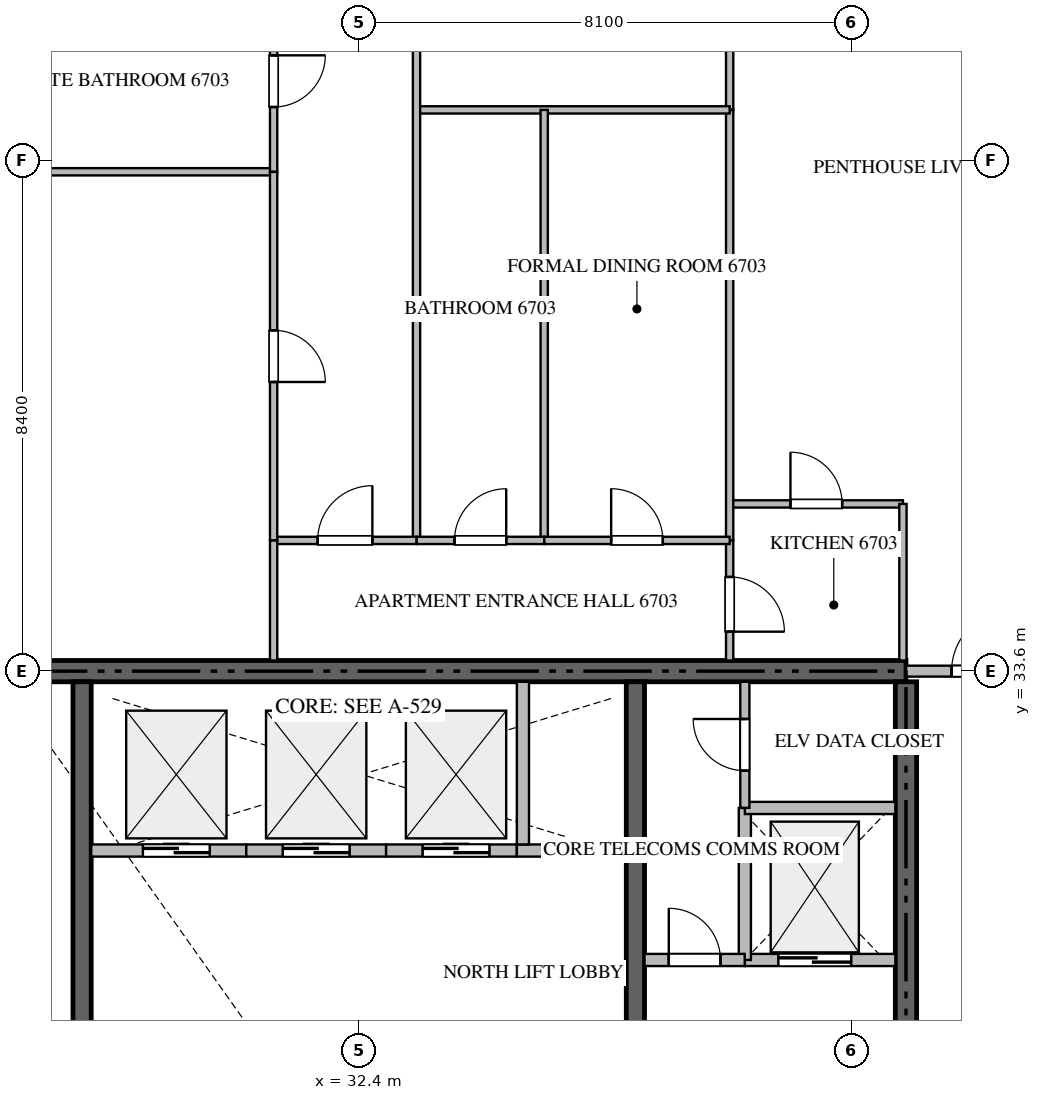
"""IFC4 building model, lengths in metres.
Left out: names, types, materials, properties, quantities, classifications, styles, units other than length and angle.
Written with IfcOpenShell. Run it as: python <this file> out.ifc"""

import sys

from ifc_helpers import new_model, si_unit, direction, frame, frame_2d, origin, place, context, subcontext, project, spatial, rectangle, extrude, source, transform, mapped, element, fill, save


model = new_model("IFC4")
c1 = context("Model", 3, precision=1e-05, world=origin(), true_north=direction((0.0, 1.0)))
c2 = subcontext(c1, "Body", "Model", "MODEL_VIEW")
j1 = project(units=[si_unit("LENGTHUNIT", "METRE"), si_unit("PLANEANGLEUNIT", "RADIAN")], contexts=[c1])
p1 = place(None, origin())
s1 = spatial("IfcSite", under=j1, at=p1, CompositionType="ELEMENT")
p2 = place(p1, origin())
s2 = spatial("IfcBuilding", under=s1, at=p2, CompositionType="ELEMENT")
p3 = place(p2, frame((0.0, 0.0, 268.2)))
s3 = spatial("IfcBuildingStorey", under=s2, at=p3, CompositionType="ELEMENT", Elevation=268.2)
p4 = place(p3, frame((41.4, 33.6, -0.26), z_axis=(0.0, 0.0, 1.0), x_axis=(-1.0, 0.0, 0.0)))
e1 = element("IfcWall", 1, at=p4, inside=s3, PredefinedType="SHEAR", context=c2, shape_type="SweptSolid", body=[
    extrude(rectangle(XDim=18.0, YDim=0.35, at=frame_2d((9.0, 0.0))), origin(), (0.0, 0.0, 1.0), 3.848),
])
p5 = place(p3, frame((41.4, 27.75, -0.26), z_axis=(0.0, 0.0, 1.0), x_axis=(0.0, 1.0, 0.0)))
e2 = element("IfcWall", 2, at=p5, inside=s3, PredefinedType="SHEAR", context=c2, shape_type="SweptSolid", body=[
    extrude(rectangle(XDim=5.675, YDim=0.35, at=frame_2d((2.837, 0.0))), origin(), (0.0, 0.0, 1.0), 3.848),
])
p6 = place(p3, frame((27.85, 23.55, -0.26), z_axis=(0.0, 0.0, 1.0), x_axis=(0.0, 1.0, 0.0)))
e3 = element("IfcWall", 3, at=p6, inside=s3, PredefinedType="SHEAR", context=c2, shape_type="SweptSolid", body=[
    extrude(rectangle(XDim=9.875, YDim=0.3, at=frame_2d((4.938, 0.0))), origin(), (0.0, 0.0, 1.0), 3.848),
])
p7 = place(p3, frame((36.95, 27.05, -0.26), z_axis=(0.0, 0.0, 1.0), x_axis=(0.0, 1.0, 0.0)))
e4 = element("IfcWall", 4, at=p7, inside=s3, PredefinedType="SHEAR", context=c2, shape_type="SweptSolid", body=[
    extrude(rectangle(XDim=6.375, YDim=0.3, at=frame_2d((3.188, 0.0))), origin(), (0.0, 0.0, 1.0), 3.848),
])
p8 = place(p3, frame((38.75, 28.85, 0.0), z_axis=(0.0, 0.0, 1.0), x_axis=(1.0, 0.0, 0.0)))
e5 = element("IfcWall", 5, at=p8, inside=s3, PredefinedType="STANDARD", context=c2, shape_type="SweptSolid", body=[
    extrude(rectangle(XDim=2.475, YDim=0.2, at=frame_2d((1.238, 0.0))), origin(), (0.0, 0.0, 1.0), 3.59),
])
p9 = place(p8, frame((0.55, 0.0, 0.0)))
e6 = element("IfcOpeningElement", 6, at=p9, cuts=e5, PredefinedType="OPENING", context=c2, shape_type="SweptSolid", body=[
    extrude(rectangle(XDim=1.2, YDim=2.2, at=frame_2d((0.6, 1.1))), frame((0.0, 0.11, 0.0), z_axis=(0.0, -1.0, 0.0), x_axis=(1.0, 0.0, 0.0)), (0.0, 0.0, 1.0), 0.22),
])
p10 = place(p3, frame((28.0, 30.65, 0.0), z_axis=(0.0, 0.0, 1.0), x_axis=(1.0, 0.0, 0.0)))
e7 = element("IfcWall", 7, at=p10, inside=s3, PredefinedType="STANDARD", context=c2, shape_type="SweptSolid", body=[
    extrude(rectangle(XDim=2.55, YDim=0.2, at=frame_2d((1.275, 0.0))), origin(), (0.0, 0.0, 1.0), 3.59),
])
p11 = place(p10, frame((0.85, 0.0, 0.0)))
e8 = element("IfcOpeningElement", 8, at=p11, cuts=e7, PredefinedType="OPENING", context=c2, shape_type="SweptSolid", body=[
    extrude(rectangle(XDim=1.1, YDim=2.2, at=frame_2d((0.55, 1.1))), frame((0.0, 0.11, 0.0), z_axis=(0.0, -1.0, 0.0), x_axis=(1.0, 0.0, 0.0)), (0.0, 0.0, 1.0), 0.22),
])
p12 = place(p3, frame((30.55, 30.65, 0.0), z_axis=(0.0, 0.0, 1.0), x_axis=(1.0, 0.0, 0.0)))
e9 = element("IfcWall", 9, at=p12, inside=s3, PredefinedType="STANDARD", context=c2, shape_type="SweptSolid", body=[
    extrude(rectangle(XDim=2.3, YDim=0.2, at=frame_2d((1.15, 0.0))), origin(), (0.0, 0.0, 1.0), 3.59),
])
p13 = place(p12, frame((0.6, 0.0, 0.0)))
e10 = element("IfcOpeningElement", 10, at=p13, cuts=e9, PredefinedType="OPENING", context=c2, shape_type="SweptSolid", body=[
    extrude(rectangle(XDim=1.1, YDim=2.2, at=frame_2d((0.55, 1.1))), frame((0.0, 0.11, 0.0), z_axis=(0.0, -1.0, 0.0), x_axis=(1.0, 0.0, 0.0)), (0.0, 0.0, 1.0), 0.22),
])
p14 = place(p3, frame((32.85, 30.65, 0.0), z_axis=(0.0, 0.0, 1.0), x_axis=(1.0, 0.0, 0.0)))
e11 = element("IfcWall", 11, at=p14, inside=s3, PredefinedType="STANDARD", context=c2, shape_type="SweptSolid", body=[
    extrude(rectangle(XDim=2.15, YDim=0.2, at=frame_2d((1.075, 0.0))), origin(), (0.0, 0.0, 1.0), 3.59),
])
p15 = place(p14, frame((0.6, 0.0, 0.0)))
e12 = element("IfcOpeningElement", 12, at=p15, cuts=e11, PredefinedType="OPENING", context=c2, shape_type="SweptSolid", body=[
    extrude(rectangle(XDim=1.1, YDim=2.2, at=frame_2d((0.55, 1.1))), frame((0.0, 0.11, 0.0), z_axis=(0.0, -1.0, 0.0), x_axis=(1.0, 0.0, 0.0)), (0.0, 0.0, 1.0), 0.22),
])
p16 = place(p3, frame((35.0, 30.65, 0.0), z_axis=(0.0, 0.0, 1.0), x_axis=(1.0, 0.0, 0.0)))
e13 = element("IfcWall", 13, at=p16, inside=s3, PredefinedType="STANDARD", context=c2, shape_type="SweptSolid", body=[
    extrude(rectangle(XDim=1.8, YDim=0.2, at=frame_2d((0.9, 0.0))), origin(), (0.0, 0.0, 1.0), 3.59),
])
p17 = place(p3, frame((35.1, 30.75, 0.0), z_axis=(0.0, 0.0, 1.0), x_axis=(0.0, 1.0, 0.0)))
e14 = element("IfcWall", 14, at=p17, inside=s3, PredefinedType="STANDARD", context=c2, shape_type="SweptSolid", body=[
    extrude(rectangle(XDim=2.675, YDim=0.2, at=frame_2d((1.337, 0.0))), origin(), (0.0, 0.0, 1.0), 3.59),
])
p18 = place(p3, frame((38.75, 28.85, 0.0), z_axis=(0.0, 0.0, 1.0), x_axis=(0.0, 1.0, 0.0)))
e15 = element("IfcWall", 15, at=p18, inside=s3, PredefinedType="STANDARD", context=c2, shape_type="SweptSolid", body=[
    extrude(rectangle(XDim=2.5, YDim=0.2, at=frame_2d((1.25, 0.0))), origin(), (0.0, 0.0, 1.0), 3.59),
])
p19 = place(p3, frame((38.75, 31.35, 0.0), z_axis=(0.0, 0.0, 1.0), x_axis=(1.0, 0.0, 0.0)))
e16 = element("IfcWall", 16, at=p19, inside=s3, PredefinedType="STANDARD", context=c2, shape_type="SweptSolid", body=[
    extrude(rectangle(XDim=2.475, YDim=0.2, at=frame_2d((1.238, 0.0))), origin(), (0.0, 0.0, 1.0), 3.59),
])
p20 = place(p3, frame((37.1, 28.85, 0.0), z_axis=(0.0, 0.0, 1.0), x_axis=(1.0, 0.0, 0.0)))
e17 = element("IfcWall", 17, at=p20, inside=s3, PredefinedType="STANDARD", context=c2, shape_type="SweptSolid", body=[
    extrude(rectangle(XDim=1.648, YDim=0.2, at=frame_2d((0.824, 0.0))), origin(), (0.0, 0.0, 1.0), 3.59),
])
p21 = place(p20, frame((0.399, 0.0, 0.0)))
e18 = element("IfcOpeningElement", 18, at=p21, cuts=e17, PredefinedType="OPENING", context=c2, shape_type="SweptSolid", body=[
    extrude(rectangle(XDim=0.85, YDim=2.1, at=frame_2d((0.425, 1.05))), frame((0.0, 0.11, 0.0), z_axis=(0.0, -1.0, 0.0), x_axis=(1.0, 0.0, 0.0)), (0.0, 0.0, 1.0), 0.22),
])
p22 = place(p3, frame((38.75, 31.352, 0.0), z_axis=(0.0, 0.0, 1.0), x_axis=(0.0, 1.0, 0.0)))
e19 = element("IfcWall", 19, at=p22, inside=s3, PredefinedType="PARTITIONING", context=c2, shape_type="SweptSolid", body=[
    extrude(rectangle(XDim=2.073, YDim=0.15, at=frame_2d((1.037, 0.0))), origin(), (0.0, 0.0, 1.0), 3.59),
])
p23 = place(p22, frame((0.611, 0.0, 0.0)))
e20 = element("IfcOpeningElement", 20, at=p23, cuts=e19, PredefinedType="OPENING", context=c2, shape_type="SweptSolid", body=[
    extrude(rectangle(XDim=0.85, YDim=2.1, at=frame_2d((0.425, 1.05))), frame((0.0, 0.085, 0.0), z_axis=(0.0, -1.0, 0.0), x_axis=(1.0, 0.0, 0.0)), (0.0, 0.0, 1.0), 0.17),
])
p24 = place(p3, frame((41.402, 33.6, 0.0), z_axis=(0.0, 0.0, 1.0), x_axis=(1.0, 0.0, 0.0)))
e21 = element("IfcWall", 21, at=p24, inside=s3, PredefinedType="PARTITIONING", context=c2, shape_type="SweptSolid", body=[
    extrude(rectangle(XDim=2.496, YDim=0.18, at=frame_2d((1.248, 0.0))), origin(), (0.0, 0.0, 1.0), 3.59),
])
p25 = place(p24, frame((0.748, 0.0, 0.0)))
e22 = element("IfcOpeningElement", 22, at=p25, cuts=e21, PredefinedType="OPENING", context=c2, shape_type="SweptSolid", body=[
    extrude(rectangle(XDim=1.0, YDim=2.15, at=frame_2d((0.5, 1.075))), frame((0.0, 0.1, 0.0), z_axis=(0.0, -1.0, 0.0), x_axis=(1.0, 0.0, 0.0)), (0.0, 0.0, 1.0), 0.2),
])
p26 = place(p3, frame((38.5, 36.35, 0.0), z_axis=(0.0, 0.0, 1.0), x_axis=(1.0, 0.0, 0.0)))
e23 = element("IfcWall", 23, at=p26, inside=s3, PredefinedType="PARTITIONING", context=c2, shape_type="SweptSolid", body=[
    extrude(rectangle(XDim=2.85, YDim=0.12, at=frame_2d((1.425, 0.0))), origin(), (0.0, 0.0, 1.0), 3.59),
])
p27 = place(p26, frame((1.0, 0.0, 0.0)))
e24 = element("IfcOpeningElement", 24, at=p27, cuts=e23, PredefinedType="OPENING", context=c2, shape_type="SweptSolid", body=[
    extrude(rectangle(XDim=0.85, YDim=2.1, at=frame_2d((0.425, 1.05))), frame((0.0, 0.07, 0.0), z_axis=(0.0, -1.0, 0.0), x_axis=(1.0, 0.0, 0.0)), (0.0, 0.0, 1.0), 0.14),
])
p28 = place(p3, frame((41.35, 36.35, 0.0), z_axis=(0.0, 0.0, 1.0), x_axis=(0.0, -1.0, 0.0)))
e25 = element("IfcWall", 25, at=p28, inside=s3, PredefinedType="PARTITIONING", context=c2, shape_type="SweptSolid", body=[
    extrude(rectangle(XDim=2.575, YDim=0.12, at=frame_2d((1.288, 0.0))), origin(), (0.0, 0.0, 1.0), 3.59),
])
p29 = place(p3, frame((38.5, 35.75, 0.0), z_axis=(0.0, 0.0, 1.0), x_axis=(0.0, -1.0, 0.0)))
e26 = element("IfcWall", 26, at=p29, inside=s3, PredefinedType="PARTITIONING", context=c2, shape_type="SweptSolid", body=[
    extrude(rectangle(XDim=1.975, YDim=0.12, at=frame_2d((0.988, 0.0))), origin(), (0.0, 0.0, 1.0), 3.59),
])
p30 = place(p29, frame((0.601, 0.0, 0.0)))
e27 = element("IfcOpeningElement", 27, at=p30, cuts=e26, PredefinedType="OPENING", context=c2, shape_type="SweptSolid", body=[
    extrude(rectangle(XDim=0.9, YDim=2.1, at=frame_2d((0.45, 1.05))), frame((0.0, 0.07, 0.0), z_axis=(0.0, -1.0, 0.0), x_axis=(1.0, 0.0, 0.0)), (0.0, 0.0, 1.0), 0.14),
])
p31 = place(p3, frame((38.5, 49.105, 0.0), z_axis=(0.0, 0.0, 1.0), x_axis=(0.0, -1.0, 0.0)))
e28 = element("IfcWall", 28, at=p31, inside=s3, PredefinedType="PARTITIONING", context=c2, shape_type="SweptSolid", body=[
    extrude(rectangle(XDim=6.275, YDim=0.12, at=frame_2d((3.137, 0.0))), origin(), (0.0, 0.0, 1.0), 3.59),
])
p32 = place(p31, frame((2.956, 0.0, 0.0)))
e29 = element("IfcOpeningElement", 29, at=p32, cuts=e28, PredefinedType="OPENING", context=c2, shape_type="SweptSolid", body=[
    extrude(rectangle(XDim=0.9, YDim=2.1, at=frame_2d((0.45, 1.05))), frame((0.0, 0.07, 0.0), z_axis=(0.0, -1.0, 0.0), x_axis=(1.0, 0.0, 0.0)), (0.0, 0.0, 1.0), 0.14),
])
p33 = place(p3, frame((38.5, 42.828, 0.0), z_axis=(0.0, 0.0, 1.0), x_axis=(0.0, -1.0, 0.0)))
e30 = element("IfcWall", 30, at=p33, inside=s3, PredefinedType="PARTITIONING", context=c2, shape_type="SweptSolid", body=[
    extrude(rectangle(XDim=7.076, YDim=0.12, at=frame_2d((3.538, 0.0))), origin(), (0.0, 0.0, 1.0), 3.59),
])
p34 = place(p3, frame((33.35, 42.83, 0.0), z_axis=(0.0, 0.0, 1.0), x_axis=(1.0, 0.0, 0.0)))
e31 = element("IfcWall", 31, at=p34, inside=s3, PredefinedType="PARTITIONING", context=c2, shape_type="SweptSolid", body=[
    extrude(rectangle(XDim=5.15, YDim=0.12, at=frame_2d((2.575, 0.0))), origin(), (0.0, 0.0, 1.0), 3.59),
])
p35 = place(p3, frame((33.35, 49.105, 0.0), z_axis=(0.0, 0.0, 1.0), x_axis=(0.0, -1.0, 0.0)))
e32 = element("IfcWall", 32, at=p35, inside=s3, PredefinedType="PARTITIONING", context=c2, shape_type="SweptSolid", body=[
    extrude(rectangle(XDim=13.355, YDim=0.12, at=frame_2d((6.677, 0.0))), origin(), (0.0, 0.0, 1.0), 3.59),
])
p36 = place(p3, frame((35.45, 42.83, 0.0), z_axis=(0.0, 0.0, 1.0), x_axis=(0.0, -1.0, 0.0)))
e33 = element("IfcWall", 33, at=p36, inside=s3, PredefinedType="PARTITIONING", context=c2, shape_type="SweptSolid", body=[
    extrude(rectangle(XDim=7.08, YDim=0.12, at=frame_2d((3.54, 0.0))), origin(), (0.0, 0.0, 1.0), 3.59),
])
p37 = place(p3, frame((33.35, 35.75, 0.0), z_axis=(0.0, 0.0, 1.0), x_axis=(1.0, 0.0, 0.0)))
e34 = element("IfcWall", 34, at=p37, inside=s3, PredefinedType="PARTITIONING", context=c2, shape_type="SweptSolid", body=[
    extrude(rectangle(XDim=2.1, YDim=0.12, at=frame_2d((1.05, 0.0))), origin(), (0.0, 0.0, 1.0), 3.59),
])
p38 = place(p37, frame((0.625, 0.0, 0.0)))
e35 = element("IfcOpeningElement", 35, at=p38, cuts=e34, PredefinedType="OPENING", context=c2, shape_type="SweptSolid", body=[
    extrude(rectangle(XDim=0.85, YDim=2.1, at=frame_2d((0.425, 1.05))), frame((0.0, 0.07, 0.0), z_axis=(0.0, -1.0, 0.0), x_axis=(1.0, 0.0, 0.0)), (0.0, 0.0, 1.0), 0.14),
])
p39 = place(p3, frame((35.452, 35.75, 0.0), z_axis=(0.0, 0.0, 1.0), x_axis=(1.0, 0.0, 0.0)))
e36 = element("IfcWall", 36, at=p39, inside=s3, PredefinedType="PARTITIONING", context=c2, shape_type="SweptSolid", body=[
    extrude(rectangle(XDim=3.048, YDim=0.12, at=frame_2d((1.524, 0.0))), origin(), (0.0, 0.0, 1.0), 3.59),
])
p40 = place(p39, frame((1.099, 0.0, 0.0)))
e37 = element("IfcOpeningElement", 37, at=p40, cuts=e36, PredefinedType="OPENING", context=c2, shape_type="SweptSolid", body=[
    extrude(rectangle(XDim=0.85, YDim=2.1, at=frame_2d((0.425, 1.05))), frame((0.0, 0.07, 0.0), z_axis=(0.0, -1.0, 0.0), x_axis=(1.0, 0.0, 0.0)), (0.0, 0.0, 1.0), 0.14),
])
p41 = place(p3, frame((31.0, 35.75, 0.0), z_axis=(0.0, 0.0, 1.0), x_axis=(1.0, 0.0, 0.0)))
e38 = element("IfcWall", 38, at=p41, inside=s3, PredefinedType="PARTITIONING", context=c2, shape_type="SweptSolid", body=[
    extrude(rectangle(XDim=2.348, YDim=0.12, at=frame_2d((1.174, 0.0))), origin(), (0.0, 0.0, 1.0), 3.59),
])
p42 = place(p41, frame((0.724, 0.0, 0.0)))
e39 = element("IfcOpeningElement", 39, at=p42, cuts=e38, PredefinedType="OPENING", context=c2, shape_type="SweptSolid", body=[
    extrude(rectangle(XDim=0.9, YDim=2.1, at=frame_2d((0.45, 1.05))), frame((0.0, 0.07, 0.0), z_axis=(0.0, -1.0, 0.0), x_axis=(1.0, 0.0, 0.0)), (0.0, 0.0, 1.0), 0.14),
])
p43 = place(p3, frame((26.3, 41.812, 0.0), z_axis=(0.0, 0.0, 1.0), x_axis=(1.0, 0.0, 0.0)))
e40 = element("IfcWall", 40, at=p43, inside=s3, PredefinedType="PARTITIONING", context=c2, shape_type="SweptSolid", body=[
    extrude(rectangle(XDim=4.7, YDim=0.12, at=frame_2d((2.35, 0.0))), origin(), (0.0, 0.0, 1.0), 3.59),
])
p44 = place(p3, frame((31.0, 44.791, 0.0), z_axis=(0.0, 0.0, 1.0), x_axis=(0.0, -1.0, 0.0)))
e41 = element("IfcWall", 41, at=p44, inside=s3, PredefinedType="PARTITIONING", context=c2, shape_type="SweptSolid", body=[
    extrude(rectangle(XDim=2.979, YDim=0.12, at=frame_2d((1.49, 0.0))), origin(), (0.0, 0.0, 1.0), 3.59),
])
p45 = place(p44, frame((1.064, 0.0, 0.0)))
e42 = element("IfcOpeningElement", 42, at=p45, cuts=e41, PredefinedType="OPENING", context=c2, shape_type="SweptSolid", body=[
    extrude(rectangle(XDim=0.85, YDim=2.1, at=frame_2d((0.425, 1.05))), frame((0.0, 0.07, 0.0), z_axis=(0.0, -1.0, 0.0), x_axis=(1.0, 0.0, 0.0)), (0.0, 0.0, 1.0), 0.14),
])
p46 = place(p3, frame((31.0, 41.81, 0.0), z_axis=(0.0, 0.0, 1.0), x_axis=(0.0, -1.0, 0.0)))
e43 = element("IfcWall", 43, at=p46, inside=s3, PredefinedType="PARTITIONING", context=c2, shape_type="SweptSolid", body=[
    extrude(rectangle(XDim=6.06, YDim=0.12, at=frame_2d((3.03, 0.0))), origin(), (0.0, 0.0, 1.0), 3.59),
])
p47 = place(p46, frame((2.605, 0.0, 0.0)))
e44 = element("IfcOpeningElement", 44, at=p47, cuts=e43, PredefinedType="OPENING", context=c2, shape_type="SweptSolid", body=[
    extrude(rectangle(XDim=0.85, YDim=2.1, at=frame_2d((0.425, 1.05))), frame((0.0, 0.07, 0.0), z_axis=(0.0, -1.0, 0.0), x_axis=(1.0, 0.0, 0.0)), (0.0, 0.0, 1.0), 0.14),
])
p48 = place(p3, frame((31.0, 35.748, 0.0), z_axis=(0.0, 0.0, 1.0), x_axis=(0.0, -1.0, 0.0)))
e45 = element("IfcWall", 45, at=p48, inside=s3, PredefinedType="PARTITIONING", context=c2, shape_type="SweptSolid", body=[
    extrude(rectangle(XDim=1.973, YDim=0.12, at=frame_2d((0.987, 0.0))), origin(), (0.0, 0.0, 1.0), 3.59),
])
m1 = source(origin(), c2, "Body", "SweptSolid", [
    extrude(rectangle(XDim=1.2, YDim=2.2, at=frame_2d((0.6, 1.1))), frame((0.0, 0.025, 0.0), z_axis=(0.0, -1.0, 0.0), x_axis=(1.0, 0.0, 0.0)), (0.0, 0.0, 1.0), 0.05),
])
p49 = place(p9, origin())
e46 = element("IfcDoor", 46, at=p49, inside=s3, OperationType="DOUBLE_DOOR_SLIDING", PredefinedType="DOOR", context=c2, shape_type="MappedRepresentation", body=[
    mapped(m1, transform((0.0, 0.0, 0.0), scale=1.0)),
])
fill(e6, e46)
m2 = source(origin(), c2, "Body", "SweptSolid", [
    extrude(rectangle(XDim=1.1, YDim=2.2, at=frame_2d((0.55, 1.1))), frame((0.0, 0.025, 0.0), z_axis=(0.0, -1.0, 0.0), x_axis=(1.0, 0.0, 0.0)), (0.0, 0.0, 1.0), 0.05),
])
p50 = place(p11, origin())
e47 = element("IfcDoor", 47, at=p50, inside=s3, OperationType="DOUBLE_DOOR_SLIDING", PredefinedType="DOOR", context=c2, shape_type="MappedRepresentation", body=[
    mapped(m2, transform((0.0, 0.0, 0.0), scale=1.0)),
])
fill(e8, e47)
p51 = place(p13, origin())
e48 = element("IfcDoor", 48, at=p51, inside=s3, OperationType="DOUBLE_DOOR_SLIDING", PredefinedType="DOOR", context=c2, shape_type="MappedRepresentation", body=[
    mapped(m2, transform((0.0, 0.0, 0.0), scale=1.0)),
])
fill(e10, e48)
p52 = place(p15, origin())
e49 = element("IfcDoor", 49, at=p52, inside=s3, OperationType="DOUBLE_DOOR_SLIDING", PredefinedType="DOOR", context=c2, shape_type="MappedRepresentation", body=[
    mapped(m2, transform((0.0, 0.0, 0.0), scale=1.0)),
])
fill(e12, e49)
m3 = source(origin(), c2, "Body", "SweptSolid", [
    extrude(rectangle(XDim=0.85, YDim=2.1, at=frame_2d((0.425, 1.05))), frame((0.0, 0.025, 0.0), z_axis=(0.0, -1.0, 0.0), x_axis=(1.0, 0.0, 0.0)), (0.0, 0.0, 1.0), 0.05),
])
p53 = place(p21, origin())
e50 = element("IfcDoor", 50, at=p53, inside=s3, OperationType="SINGLE_SWING_LEFT", PredefinedType="DOOR", context=c2, shape_type="MappedRepresentation", body=[
    mapped(m3, transform((0.0, 0.0, 0.0), scale=1.0)),
])
fill(e18, e50)
p54 = place(p23, origin())
e51 = element("IfcDoor", 51, at=p54, inside=s3, OperationType="SINGLE_SWING_RIGHT", PredefinedType="DOOR", context=c2, shape_type="MappedRepresentation", body=[
    mapped(m3, transform((0.0, 0.0, 0.0), scale=1.0)),
])
fill(e20, e51)
m4 = source(origin(), c2, "Body", "SweptSolid", [
    extrude(rectangle(XDim=1.0, YDim=2.15, at=frame_2d((0.5, 1.075))), frame((0.0, 0.025, 0.0), z_axis=(0.0, -1.0, 0.0), x_axis=(1.0, 0.0, 0.0)), (0.0, 0.0, 1.0), 0.05),
])
p55 = place(p25, origin())
e52 = element("IfcDoor", 52, at=p55, inside=s3, OperationType="SINGLE_SWING_RIGHT", PredefinedType="DOOR", context=c2, shape_type="MappedRepresentation", body=[
    mapped(m4, transform((0.0, 0.0, 0.0), scale=1.0)),
])
fill(e22, e52)
p56 = place(p27, origin())
e53 = element("IfcDoor", 53, at=p56, inside=s3, OperationType="SINGLE_SWING_LEFT", PredefinedType="DOOR", context=c2, shape_type="MappedRepresentation", body=[
    mapped(m3, transform((0.0, 0.0, 0.0), scale=1.0)),
])
fill(e24, e53)
m5 = source(origin(), c2, "Body", "SweptSolid", [
    extrude(rectangle(XDim=0.9, YDim=2.1, at=frame_2d((0.45, 1.05))), frame((0.0, 0.025, 0.0), z_axis=(0.0, -1.0, 0.0), x_axis=(1.0, 0.0, 0.0)), (0.0, 0.0, 1.0), 0.05),
])
p57 = place(p30, origin())
e54 = element("IfcDoor", 54, at=p57, inside=s3, OperationType="SINGLE_SWING_RIGHT", PredefinedType="DOOR", context=c2, shape_type="MappedRepresentation", body=[
    mapped(m5, transform((0.0, 0.0, 0.0), scale=1.0)),
])
fill(e27, e54)
p58 = place(p38, origin())
e55 = element("IfcDoor", 55, at=p58, inside=s3, OperationType="SINGLE_SWING_RIGHT", PredefinedType="DOOR", context=c2, shape_type="MappedRepresentation", body=[
    mapped(m3, transform((0.0, 0.0, 0.0), scale=1.0)),
])
fill(e35, e55)
p59 = place(p40, origin())
e56 = element("IfcDoor", 56, at=p59, inside=s3, OperationType="SINGLE_SWING_LEFT", PredefinedType="DOOR", context=c2, shape_type="MappedRepresentation", body=[
    mapped(m3, transform((0.0, 0.0, 0.0), scale=1.0)),
])
fill(e37, e56)
p60 = place(p42, origin())
e57 = element("IfcDoor", 57, at=p60, inside=s3, OperationType="SINGLE_SWING_RIGHT", PredefinedType="DOOR", context=c2, shape_type="MappedRepresentation", body=[
    mapped(m5, transform((0.0, 0.0, 0.0), scale=1.0)),
])
fill(e39, e57)
p61 = place(p45, origin())
e58 = element("IfcDoor", 58, at=p61, inside=s3, OperationType="SINGLE_SWING_LEFT", PredefinedType="DOOR", context=c2, shape_type="MappedRepresentation", body=[
    mapped(m3, transform((0.0, 0.0, 0.0), scale=1.0)),
])
fill(e42, e58)
p62 = place(p47, origin())
e59 = element("IfcDoor", 59, at=p62, inside=s3, OperationType="SINGLE_SWING_RIGHT", PredefinedType="DOOR", context=c2, shape_type="MappedRepresentation", body=[
    mapped(m3, transform((0.0, 0.0, 0.0), scale=1.0)),
])
fill(e44, e59)
save(model, sys.argv[1])
